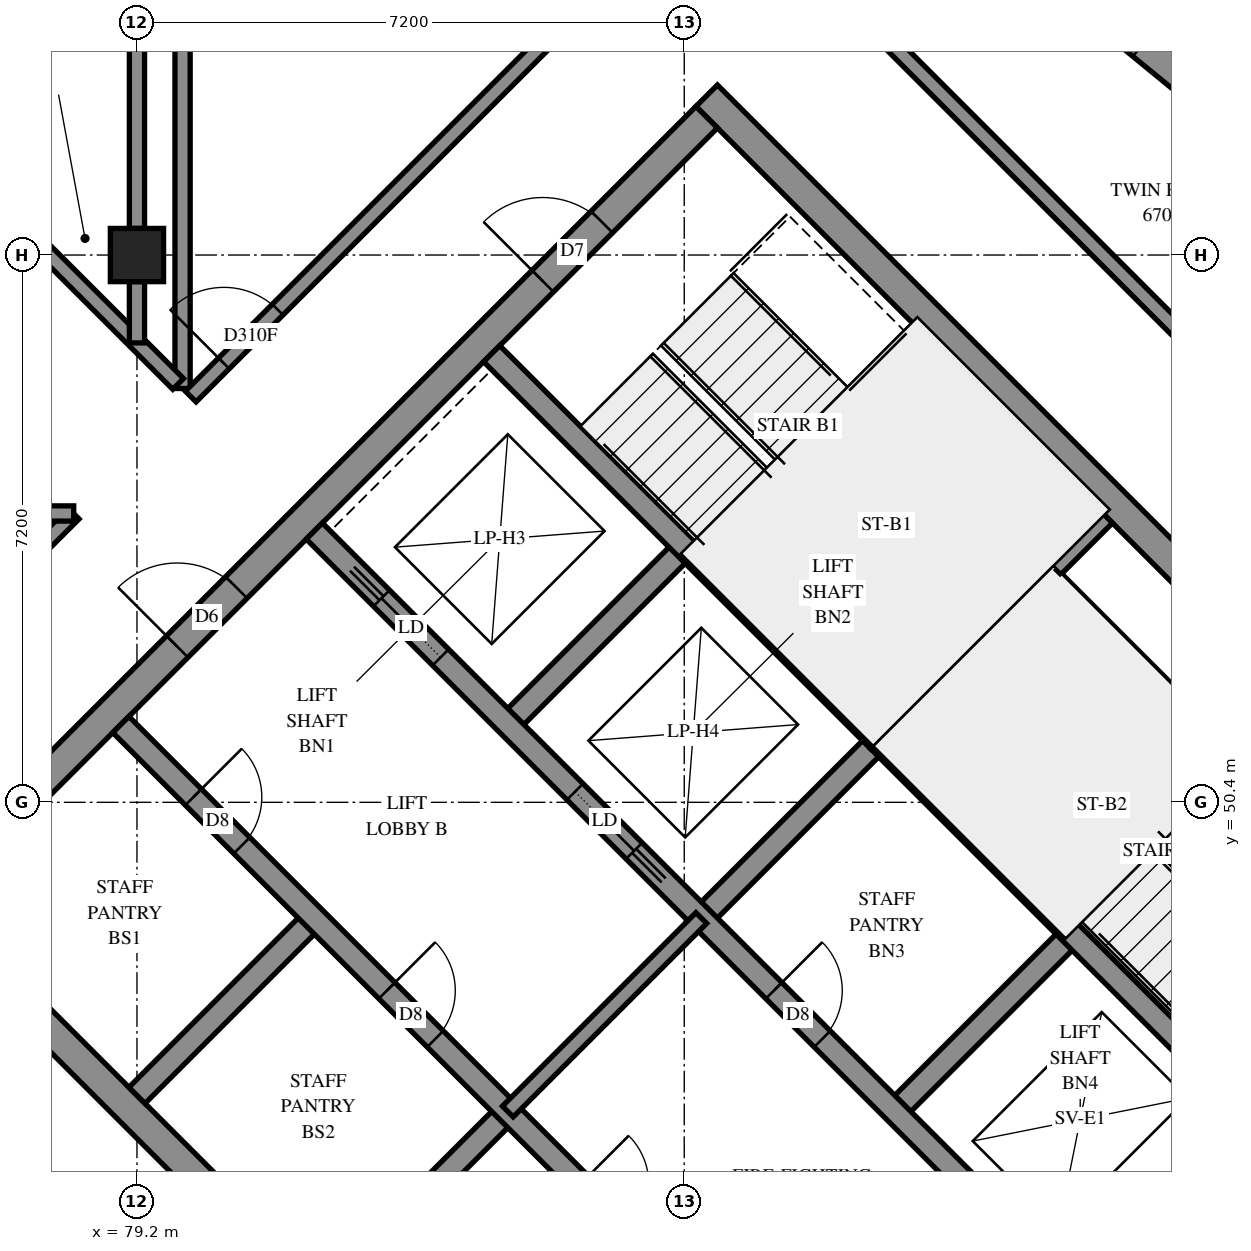
"""IFC4 building model, lengths in metres.
Left out: names, types, materials, properties, quantities, classifications, styles, units other than length and angle.
Written with IfcOpenShell. Run it as: python <this file> out.ifc"""

import sys

from ifc_helpers import new_model, si_unit, direction, frame, frame_2d, origin, origin_2d, place, context, subcontext, project, spatial, polyline, rectangle, outline, extrude, element, fill, save


model = new_model("IFC4")
c1 = context("Model", 3, precision=1e-05, world=origin(), true_north=direction((0.0, 1.0)))
c2 = subcontext(c1, "Body", "Model", "MODEL_VIEW")
j1 = project(units=[si_unit("LENGTHUNIT", "METRE"), si_unit("PLANEANGLEUNIT", "RADIAN")], contexts=[c1])
p1 = place(None, origin())
s1 = spatial("IfcSite", under=j1, at=p1, CompositionType="ELEMENT")
p2 = place(p1, origin())
s2 = spatial("IfcBuilding", under=s1, at=p2, CompositionType="ELEMENT")
p3 = place(p2, frame((0.0, 0.0, 247.2)))
s3 = spatial("IfcBuildingStorey", under=s2, at=p3, CompositionType="ELEMENT", Elevation=247.2)
p4 = place(p3, frame((79.2, 57.6, 0.0), z_axis=(0.0, 0.0, 1.0), x_axis=(1.0, 0.0, 0.0)))
e1 = element("IfcColumn", 1, at=p4, inside=s3, PredefinedType="COLUMN", context=c2, shape_type="SweptSolid", body=[
    extrude(rectangle(XDim=0.7, YDim=0.7, at=origin_2d()), origin(), (0.0, 0.0, 1.0), 3.1),
])
p5 = place(p3, frame((76.23, 49.231, -0.3), z_axis=(0.0, 0.0, 1.0), x_axis=(0.7071034917, -0.7071100706, 0.0)))
e2 = element("IfcWall", 2, at=p5, inside=s3, PredefinedType="SHEAR", context=c2, shape_type="SweptSolid", body=[
    extrude(rectangle(XDim=15.2, YDim=0.4, at=frame_2d((7.6, 0.0))), origin(), (0.0, 0.0, 1.0), 2.7),
])
p6 = place(p3, frame((86.695, 59.696, -0.3), z_axis=(0.0, 0.0, 1.0), x_axis=(0.7071100706, -0.7071034917, 0.0)))
e3 = element("IfcWall", 3, at=p6, inside=s3, PredefinedType="SHEAR", context=c2, shape_type="SweptSolid", body=[
    extrude(rectangle(XDim=15.2, YDim=0.4, at=frame_2d((7.6, 0.0))), origin(), (0.0, 0.0, 1.0), 2.7),
])
p7 = place(p6, frame((10.4, 0.0, 0.3)))
e4 = element("IfcOpeningElement", 4, at=p7, cuts=e3, PredefinedType="OPENING", context=c2, shape_type="SweptSolid", body=[
    extrude(rectangle(XDim=0.8, YDim=2.1, at=frame_2d((0.4, 1.05))), frame((0.0, 0.21, 0.0), z_axis=(0.0, -1.0, 0.0), x_axis=(1.0, 0.0, 0.0)), (0.0, 0.0, 1.0), 0.42),
])
p8 = place(p3, frame((76.513, 49.231, -0.3), z_axis=(0.0, 0.0, 1.0), x_axis=(0.7071067812, 0.7071067812, 0.0)))
e5 = element("IfcWall", 5, at=p8, inside=s3, PredefinedType="SHEAR", context=c2, shape_type="SweptSolid", body=[
    extrude(rectangle(XDim=14.4, YDim=0.4, at=frame_2d((7.2, 0.0))), origin(), (0.0, 0.0, 1.0), 2.7),
])
p9 = place(p8, frame((4.55, 0.0, 0.3)))
e6 = element("IfcOpeningElement", 6, at=p9, cuts=e5, PredefinedType="OPENING", context=c2, shape_type="SweptSolid", body=[
    extrude(rectangle(XDim=1.1, YDim=2.1, at=frame_2d((0.55, 1.05))), frame((0.0, 0.21, 0.0), z_axis=(0.0, -1.0, 0.0), x_axis=(1.0, 0.0, 0.0)), (0.0, 0.0, 1.0), 0.42),
])
p10 = place(p8, frame((11.35, 0.0, 0.3)))
e7 = element("IfcOpeningElement", 7, at=p10, cuts=e5, PredefinedType="OPENING", context=c2, shape_type="SweptSolid", body=[
    extrude(rectangle(XDim=1.1, YDim=2.1, at=frame_2d((0.55, 1.05))), frame((0.0, 0.21, 0.0), z_axis=(0.0, -1.0, 0.0), x_axis=(1.0, 0.0, 0.0)), (0.0, 0.0, 1.0), 0.42),
])
p11 = place(p3, frame((86.978, 38.766, -0.3), z_axis=(0.0, 0.0, 1.0), x_axis=(0.7071067812, 0.7071067812, 0.0)))
e8 = element("IfcWall", 8, at=p11, inside=s3, PredefinedType="SHEAR", context=c2, shape_type="SweptSolid", body=[
    extrude(rectangle(XDim=14.4, YDim=0.4, at=frame_2d((7.2, 0.0))), origin(), (0.0, 0.0, 1.0), 2.7),
])
p12 = place(p11, frame((4.55, 0.0, 0.3)))
e9 = element("IfcOpeningElement", 9, at=p12, cuts=e8, PredefinedType="OPENING", context=c2, shape_type="SweptSolid", body=[
    extrude(rectangle(XDim=1.1, YDim=2.1, at=frame_2d((0.55, 1.05))), frame((0.0, 0.21, 0.0), z_axis=(0.0, -1.0, 0.0), x_axis=(1.0, 0.0, 0.0)), (0.0, 0.0, 1.0), 0.42),
])
p13 = place(p11, frame((11.35, 0.0, 0.3)))
e10 = element("IfcOpeningElement", 10, at=p13, cuts=e8, PredefinedType="OPENING", context=c2, shape_type="SweptSolid", body=[
    extrude(rectangle(XDim=1.1, YDim=2.1, at=frame_2d((0.55, 1.05))), frame((0.0, 0.21, 0.0), z_axis=(0.0, -1.0, 0.0), x_axis=(1.0, 0.0, 0.0)), (0.0, 0.0, 1.0), 0.42),
])
for number, where, z_axis, x_axis in (
    (11, (79.2, 46.544, 0.0), (0.0, 0.0, 1.0), (0.707, 0.707, 0.0)),
    (12, (84.079, 51.423, 0.0), (0.0, 0.0, 1.0), (0.707, 0.707, 0.0)),
):
    element("IfcWall", number, at=place(p3, frame(where, z_axis=z_axis, x_axis=x_axis)), inside=s3, PredefinedType="SOLIDWALL", context=c2, shape_type="SweptSolid", body=[
        extrude(rectangle(XDim=3.3, YDim=0.3, at=frame_2d((1.65, 0.0))), origin(), (0.0, 0.0, 1.0), 3.1),
    ])
p14 = place(p3, frame((81.746, 43.999, 0.0), z_axis=(0.0, 0.0, 1.0), x_axis=(0.7071067812, 0.7071067812, 0.0)))
e13 = element("IfcWall", 13, at=p14, inside=s3, PredefinedType="SOLIDWALL", context=c2, shape_type="SweptSolid", body=[
    extrude(rectangle(XDim=3.3, YDim=0.3, at=frame_2d((1.65, 0.0))), origin(), (0.0, 0.0, 1.0), 3.1),
])
for number, where, z_axis, x_axis in (
    (14, (86.625, 48.878, 0.0), (0.0, 0.0, 1.0), (0.707, 0.707, 0.0)),
    (15, (89.17, 46.332, 0.0), (0.0, 0.0, 1.0), (0.707, 0.707, 0.0)),
):
    element("IfcWall", number, at=place(p3, frame(where, z_axis=z_axis, x_axis=x_axis)), inside=s3, PredefinedType="SOLIDWALL", context=c2, shape_type="SweptSolid", body=[
        extrude(rectangle(XDim=3.3, YDim=0.3, at=frame_2d((1.65, 0.0))), origin(), (0.0, 0.0, 1.0), 3.1),
    ])
p15 = place(p3, frame((78.988, 51.423, 0.0), z_axis=(0.0, 0.0, 1.0), x_axis=(0.7071067812, -0.7071067812, 0.0)))
e16 = element("IfcWall", 16, at=p15, inside=s3, PredefinedType="SOLIDWALL", context=c2, shape_type="SweptSolid", body=[
    extrude(rectangle(XDim=14.4, YDim=0.3, at=frame_2d((7.2, 0.0))), origin(), (0.0, 0.0, 1.0), 3.1),
])
p16 = place(p15, frame((1.35, 0.0, 0.0)))
e17 = element("IfcOpeningElement", 17, at=p16, cuts=e16, PredefinedType="OPENING", context=c2, shape_type="SweptSolid", body=[
    extrude(rectangle(XDim=0.9, YDim=2.1, at=frame_2d((0.45, 1.05))), frame((0.0, 0.16, 0.0), z_axis=(0.0, -1.0, 0.0), x_axis=(1.0, 0.0, 0.0)), (0.0, 0.0, 1.0), 0.32),
])
p17 = place(p15, frame((4.95, 0.0, 0.0)))
e18 = element("IfcOpeningElement", 18, at=p17, cuts=e16, PredefinedType="OPENING", context=c2, shape_type="SweptSolid", body=[
    extrude(rectangle(XDim=0.9, YDim=2.1, at=frame_2d((0.45, 1.05))), frame((0.0, 0.16, 0.0), z_axis=(0.0, -1.0, 0.0), x_axis=(1.0, 0.0, 0.0)), (0.0, 0.0, 1.0), 0.32),
])
p18 = place(p15, frame((8.55, 0.0, 0.0)))
e19 = element("IfcOpeningElement", 19, at=p18, cuts=e16, PredefinedType="OPENING", context=c2, shape_type="SweptSolid", body=[
    extrude(rectangle(XDim=0.9, YDim=2.1, at=frame_2d((0.45, 1.05))), frame((0.0, 0.16, 0.0), z_axis=(0.0, -1.0, 0.0), x_axis=(1.0, 0.0, 0.0)), (0.0, 0.0, 1.0), 0.32),
])
p19 = place(p15, frame((12.05, 0.0, 0.0)))
e20 = element("IfcOpeningElement", 20, at=p19, cuts=e16, PredefinedType="OPENING", context=c2, shape_type="SweptSolid", body=[
    extrude(rectangle(XDim=1.1, YDim=2.1, at=frame_2d((0.55, 1.05))), frame((0.0, 0.16, 0.0), z_axis=(0.0, -1.0, 0.0), x_axis=(1.0, 0.0, 0.0)), (0.0, 0.0, 1.0), 0.32),
])
p20 = place(p3, frame((81.534, 53.969, 0.0), z_axis=(0.0, 0.0, 1.0), x_axis=(0.707103309, -0.7071102534, 0.0)))
e21 = element("IfcWall", 21, at=p20, inside=s3, PredefinedType="SOLIDWALL", context=c2, shape_type="SweptSolid", body=[
    extrude(rectangle(XDim=14.4, YDim=0.3, at=frame_2d((7.2, 0.0))), origin(), (0.0, 0.0, 1.0), 3.1),
])
p21 = place(p20, frame((8.55, 0.0, 0.0)))
e22 = element("IfcOpeningElement", 22, at=p21, cuts=e21, PredefinedType="OPENING", context=c2, shape_type="SweptSolid", body=[
    extrude(rectangle(XDim=0.9, YDim=2.1, at=frame_2d((0.45, 1.05))), frame((0.0, 0.16, 0.0), z_axis=(0.0, -1.0, 0.0), x_axis=(1.0, 0.0, 0.0)), (0.0, 0.0, 1.0), 0.32),
])
p22 = place(p20, frame((1.25, 0.0, 0.0)))
e23 = element("IfcOpeningElement", 23, at=p22, cuts=e21, PredefinedType="OPENING", context=c2, shape_type="SweptSolid", body=[
    extrude(rectangle(XDim=1.1, YDim=2.1, at=frame_2d((0.55, 1.05))), frame((0.0, 0.16, 0.0), z_axis=(0.0, -1.0, 0.0), x_axis=(1.0, 0.0, 0.0)), (0.0, 0.0, 1.0), 0.32),
])
p23 = place(p20, frame((4.85, 0.0, 0.0)))
e24 = element("IfcOpeningElement", 24, at=p23, cuts=e21, PredefinedType="OPENING", context=c2, shape_type="SweptSolid", body=[
    extrude(rectangle(XDim=1.1, YDim=2.1, at=frame_2d((0.55, 1.05))), frame((0.0, 0.16, 0.0), z_axis=(0.0, -1.0, 0.0), x_axis=(1.0, 0.0, 0.0)), (0.0, 0.0, 1.0), 0.32),
])
p24 = place(p20, frame((12.05, 0.0, 0.0)))
e25 = element("IfcOpeningElement", 25, at=p24, cuts=e21, PredefinedType="OPENING", context=c2, shape_type="SweptSolid", body=[
    extrude(rectangle(XDim=1.1, YDim=2.1, at=frame_2d((0.55, 1.05))), frame((0.0, 0.16, 0.0), z_axis=(0.0, -1.0, 0.0), x_axis=(1.0, 0.0, 0.0)), (0.0, 0.0, 1.0), 0.32),
])
for number, where, z_axis, x_axis in (
    (26, (83.867, 56.302, 0.0), (0.0, 0.0, 1.0), (0.707, -0.707, 0.0)),
    (27, (88.958, 51.211, 0.0), (0.0, 0.0, 1.0), (0.707, -0.707, 0.0)),
):
    element("IfcWall", number, at=place(p3, frame(where, z_axis=z_axis, x_axis=x_axis)), inside=s3, PredefinedType="SOLIDWALL", context=c2, shape_type="SweptSolid", body=[
        extrude(rectangle(XDim=7.2, YDim=0.3, at=frame_2d((3.6, 0.0))), origin(), (0.0, 0.0, 1.0), 3.1),
    ])
p25 = place(p3, frame((88.958, 51.211, 0.0), z_axis=(0.0, 0.0, 1.0), x_axis=(0.7071067812, 0.7071067812, 0.0)))
e28 = element("IfcWall", 28, at=p25, inside=s3, PredefinedType="SOLIDWALL", context=c2, shape_type="SweptSolid", body=[
    extrude(rectangle(XDim=4.2, YDim=0.3, at=frame_2d((2.1, 0.0))), origin(), (0.0, 0.0, 1.0), 3.1),
])
p26 = place(p3, frame((93.619, 59.425, 0.0), z_axis=(0.0, 0.0, 1.0), x_axis=(-0.7734134923, 0.6339018614, 0.0)))
e29 = element("IfcWall", 29, at=p26, inside=s3, PredefinedType="SOLIDWALL", context=c2, shape_type="SweptSolid", body=[
    extrude(outline(polyline([(-0.022, -0.225), (3.322, -0.225), (3.367, 0.225), (0.022, 0.225), (-0.022, -0.225)])), origin(), (0.0, 0.0, 1.0), 3.1),
])
p27 = place(p26, frame((1.518, 0.0, 0.45)))
e30 = element("IfcOpeningElement", 30, at=p27, cuts=e29, PredefinedType="OPENING", context=c2, shape_type="SweptSolid", body=[
    extrude(rectangle(XDim=1.2, YDim=2.55, at=frame_2d((0.6, 1.275))), frame((0.0, 0.235, 0.0), z_axis=(0.0, -1.0, 0.0), x_axis=(1.0, 0.0, 0.0)), (0.0, 0.0, 1.0), 0.47),
])
p28 = place(p3, frame((91.313, 53.354, 0.0), z_axis=(0.0, 0.0, 1.0), x_axis=(0.7071067812, -0.7071067812, 0.0)))
e31 = element("IfcWall", 31, at=p28, inside=s3, PredefinedType="PARTITIONING", context=c2, shape_type="SweptSolid", body=[
    extrude(rectangle(XDim=5.65, YDim=0.15, at=frame_2d((2.825, 0.0))), origin(), (0.0, 0.0, 1.0), 3.1),
])
p29 = place(p3, frame((84.079, 46.332, 0.0), z_axis=(0.0, 0.0, 1.0), x_axis=(0.7071067812, 0.7071067812, 0.0)))
e32 = element("IfcWall", 32, at=p29, inside=s3, PredefinedType="PARTITIONING", context=c2, shape_type="SweptSolid", body=[
    extrude(rectangle(XDim=3.6, YDim=0.2, at=frame_2d((1.8, 0.0))), origin(), (0.0, 0.0, 1.0), 3.1),
])
p30 = place(p3, frame((79.8, 55.844, 0.0), z_axis=(0.0, 0.0, 1.0), x_axis=(0.0, 1.0, 0.0)))
e33 = element("IfcWall", 33, at=p30, inside=s3, PredefinedType="PARTITIONING", context=c2, shape_type="SweptSolid", body=[
    extrude(rectangle(XDim=11.664, YDim=0.2, at=frame_2d((5.832, 0.0))), origin(), (0.0, 0.0, 1.0), 3.1),
])
p31 = place(p3, frame((79.907, 55.739, 0.0), z_axis=(0.0, 0.0, 1.0), x_axis=(0.7071067812, 0.7071067812, 0.0)))
e34 = element("IfcWall", 34, at=p31, inside=s3, PredefinedType="PARTITIONING", context=c2, shape_type="SweptSolid", body=[
    extrude(rectangle(XDim=9.798, YDim=0.2, at=frame_2d((4.899, 0.0))), origin(), (0.0, 0.0, 1.0), 3.1),
])
p32 = place(p31, frame((0.617, 0.0, 0.0)))
e35 = element("IfcOpeningElement", 35, at=p32, cuts=e34, PredefinedType="OPENING", context=c2, shape_type="SweptSolid", body=[
    extrude(rectangle(XDim=1.0, YDim=2.1, at=frame_2d((0.5, 1.05))), frame((0.0, 0.11, 0.0), z_axis=(0.0, -1.0, 0.0), x_axis=(1.0, 0.0, 0.0)), (0.0, 0.0, 1.0), 0.22),
])
p33 = place(p3, frame((88.535, 60.971, 0.0), z_axis=(0.0, 0.0, 1.0), x_axis=(0.7069678741, -0.707245661, 0.0)))
e36 = element("IfcWall", 36, at=p33, inside=s3, PredefinedType="PARTITIONING", context=c2, shape_type="SweptSolid", body=[
    extrude(rectangle(XDim=7.2, YDim=0.2, at=frame_2d((3.6, 0.0))), origin(), (0.0, 0.0, 1.0), 3.1),
])
p34 = place(p3, frame((74.401, 50.233, 0.0), z_axis=(0.0, 0.0, 1.0), x_axis=(0.7071067812, 0.7071067812, 0.0)))
e37 = element("IfcWall", 37, at=p34, inside=s3, PredefinedType="PARTITIONING", context=c2, shape_type="SweptSolid", body=[
    extrude(rectangle(XDim=5.609, YDim=0.2, at=frame_2d((2.804, 0.0))), origin(), (0.0, 0.0, 1.0), 3.1),
])
p35 = place(p3, frame((76.513, 59.131, 0.0), z_axis=(0.0, 0.0, 1.0), x_axis=(0.7073586681, -0.7068548045, 0.0)))
e38 = element("IfcWall", 38, at=p35, inside=s3, PredefinedType="PARTITIONING", context=c2, shape_type="SweptSolid", body=[
    extrude(rectangle(XDim=4.565, YDim=0.2, at=frame_2d((2.282, 0.0))), origin(), (0.0, 0.0, 1.0), 3.1),
])
p36 = place(p3, frame((74.402, 54.2, 0.0), z_axis=(0.0, 0.0, 1.0), x_axis=(1.0, 0.0, 0.0)))
e39 = element("IfcWall", 39, at=p36, inside=s3, PredefinedType="PARTITIONING", context=c2, shape_type="SweptSolid", body=[
    extrude(rectangle(XDim=3.966, YDim=0.2, at=frame_2d((1.983, 0.0))), origin(), (0.0, 0.0, 1.0), 3.1),
])
p37 = place(p36, frame((0.649, 0.0, 0.0)))
e40 = element("IfcOpeningElement", 40, at=p37, cuts=e39, PredefinedType="OPENING", context=c2, shape_type="SweptSolid", body=[
    extrude(rectangle(XDim=1.0, YDim=2.1, at=frame_2d((0.5, 1.05))), frame((0.0, 0.11, 0.0), z_axis=(0.0, -1.0, 0.0), x_axis=(1.0, 0.0, 0.0)), (0.0, 0.0, 1.0), 0.22),
])
p38 = place(p3, frame((79.2, 57.95, 0.0), z_axis=(0.0, 0.0, 1.0), x_axis=(0.0, 1.0, 0.0)))
e41 = element("IfcWall", 41, at=p38, inside=s3, PredefinedType="PARTITIONING", context=c2, shape_type="SweptSolid", body=[
    extrude(rectangle(XDim=3.45, YDim=0.2, at=frame_2d((1.725, 0.0))), origin(), (0.0, 0.0, 1.0), 3.1),
])
p39 = place(p3, frame((79.2, 56.444, 0.0), z_axis=(0.0, 0.0, 1.0), x_axis=(0.0, 1.0, 0.0)))
e42 = element("IfcWall", 42, at=p39, inside=s3, PredefinedType="PARTITIONING", context=c2, shape_type="SweptSolid", body=[
    extrude(rectangle(XDim=0.806, YDim=0.2, at=frame_2d((0.403, 0.0))), origin(), (0.0, 0.0, 1.0), 3.1),
])
p40 = place(p27, origin())
e43 = element("IfcWindow", 43, at=p40, inside=s3, PartitioningType="SINGLE_PANEL", PredefinedType="WINDOW", context=c2, shape_type="SweptSolid", body=[
    extrude(rectangle(XDim=1.2, YDim=2.55, at=frame_2d((0.6, 1.275))), frame((0.0, 0.205, 0.0), z_axis=(0.0, -1.0, 0.0), x_axis=(1.0, 0.0, 0.0)), (0.0, 0.0, 1.0), 0.06),
])
fill(e30, e43)
p41 = place(p9, origin())
e44 = element("IfcDoor", 44, at=p41, inside=s3, OperationType="DOUBLE_DOOR_SINGLE_SWING", PredefinedType="DOOR", context=c2, shape_type="SweptSolid", body=[
    extrude(rectangle(XDim=1.1, YDim=2.1, at=frame_2d((0.55, 1.05))), frame((0.0, 0.025, 0.0), z_axis=(0.0, -1.0, 0.0), x_axis=(1.0, 0.0, 0.0)), (0.0, 0.0, 1.0), 0.05),
])
fill(e6, e44)
p42 = place(p10, origin())
e45 = element("IfcDoor", 45, at=p42, inside=s3, OperationType="SINGLE_SWING_LEFT", PredefinedType="DOOR", context=c2, shape_type="SweptSolid", body=[
    extrude(rectangle(XDim=1.1, YDim=2.1, at=frame_2d((0.55, 1.05))), frame((0.0, 0.025, 0.0), z_axis=(0.0, -1.0, 0.0), x_axis=(1.0, 0.0, 0.0)), (0.0, 0.0, 1.0), 0.05),
])
fill(e7, e45)
p43 = place(p16, origin())
e46 = element("IfcDoor", 46, at=p43, inside=s3, OperationType="SINGLE_SWING_LEFT", PredefinedType="DOOR", context=c2, shape_type="SweptSolid", body=[
    extrude(rectangle(XDim=0.9, YDim=2.1, at=frame_2d((0.45, 1.05))), frame((0.0, 0.025, 0.0), z_axis=(0.0, -1.0, 0.0), x_axis=(1.0, 0.0, 0.0)), (0.0, 0.0, 1.0), 0.05),
])
fill(e17, e46)
p44 = place(p17, origin())
e47 = element("IfcDoor", 47, at=p44, inside=s3, OperationType="SINGLE_SWING_LEFT", PredefinedType="DOOR", context=c2, shape_type="SweptSolid", body=[
    extrude(rectangle(XDim=0.9, YDim=2.1, at=frame_2d((0.45, 1.05))), frame((0.0, 0.025, 0.0), z_axis=(0.0, -1.0, 0.0), x_axis=(1.0, 0.0, 0.0)), (0.0, 0.0, 1.0), 0.05),
])
fill(e18, e47)
p45 = place(p21, origin())
e48 = element("IfcDoor", 48, at=p45, inside=s3, OperationType="SINGLE_SWING_LEFT", PredefinedType="DOOR", context=c2, shape_type="SweptSolid", body=[
    extrude(rectangle(XDim=0.9, YDim=2.1, at=frame_2d((0.45, 1.05))), frame((0.0, 0.025, 0.0), z_axis=(0.0, -1.0, 0.0), x_axis=(1.0, 0.0, 0.0)), (0.0, 0.0, 1.0), 0.05),
])
fill(e22, e48)
p46 = place(p22, origin())
e49 = element("IfcDoor", 49, at=p46, inside=s3, OperationType="SLIDING_TO_LEFT", PredefinedType="DOOR", context=c2, shape_type="SweptSolid", body=[
    extrude(rectangle(XDim=1.1, YDim=2.1, at=frame_2d((0.55, 1.05))), frame((0.0, 0.025, 0.0), z_axis=(0.0, -1.0, 0.0), x_axis=(1.0, 0.0, 0.0)), (0.0, 0.0, 1.0), 0.05),
])
fill(e23, e49)
p47 = place(p23, origin())
e50 = element("IfcDoor", 50, at=p47, inside=s3, OperationType="SLIDING_TO_RIGHT", PredefinedType="DOOR", context=c2, shape_type="SweptSolid", body=[
    extrude(rectangle(XDim=1.1, YDim=2.1, at=frame_2d((0.55, 1.05))), frame((0.0, 0.025, 0.0), z_axis=(0.0, -1.0, 0.0), x_axis=(1.0, 0.0, 0.0)), (0.0, 0.0, 1.0), 0.05),
])
fill(e24, e50)
p48 = place(p32, origin())
e51 = element("IfcDoor", 51, at=p48, inside=s3, OperationType="SINGLE_SWING_RIGHT", PredefinedType="DOOR", context=c2, shape_type="SweptSolid", body=[
    extrude(rectangle(XDim=1.0, YDim=2.1, at=frame_2d((0.5, 1.05))), frame((0.0, 0.025, 0.0), z_axis=(0.0, -1.0, 0.0), x_axis=(1.0, 0.0, 0.0)), (0.0, 0.0, 1.0), 0.05),
])
fill(e35, e51)
save(model, sys.argv[1])
